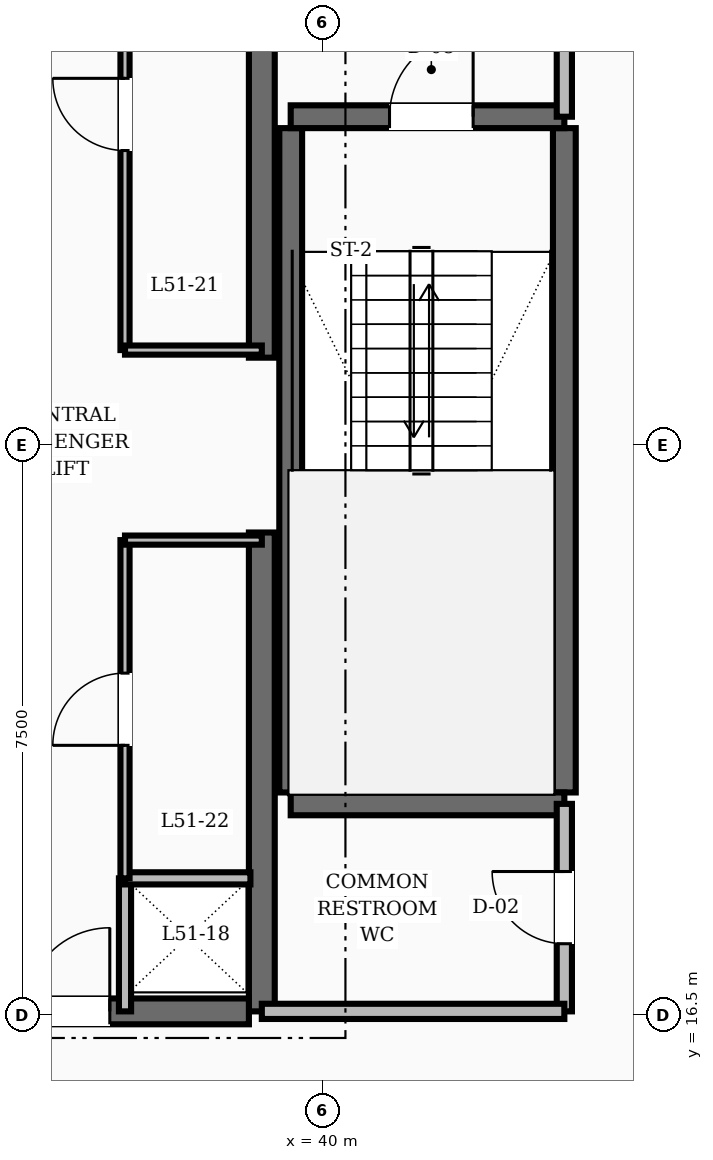
"""IFC4 building model, lengths in metres.
Left out: names, types, materials, properties, quantities, classifications, styles, units other than length and angle.
Written with IfcOpenShell. Run it as: python <this file> out.ifc"""

import sys

from ifc_helpers import new_model, si_unit, direction, frame, frame_2d, origin, place, context, subcontext, project, spatial, rectangle, extrude, element, fill, save


model = new_model("IFC4")
c1 = context("Model", 3, precision=1e-05, world=origin(), true_north=direction((0.0, 1.0)))
c2 = subcontext(c1, "Body", "Model", "MODEL_VIEW")
j1 = project(units=[si_unit("LENGTHUNIT", "METRE"), si_unit("PLANEANGLEUNIT", "RADIAN")], contexts=[c1])
p1 = place(None, origin())
s1 = spatial("IfcSite", under=j1, at=p1, CompositionType="ELEMENT")
p2 = place(p1, origin())
s2 = spatial("IfcBuilding", under=s1, at=p2, CompositionType="ELEMENT")
p3 = place(p2, frame((0.0, 0.0, 196.4)))
s3 = spatial("IfcBuildingStorey", under=s2, at=p3, CompositionType="ELEMENT", Elevation=196.4)
for number, where, z_axis, x_axis in (
    (1, (39.2, 16.55, 0.0), (0.0, 0.0, 1.0), (0.0, 1.0, 0.0)),
    (2, (39.2, 25.15, 0.0), (0.0, 0.0, 1.0), (0.0, 1.0, 0.0)),
):
    element("IfcWall", number, at=place(p3, frame(where, z_axis=z_axis, x_axis=x_axis)), inside=s3, PredefinedType="SHEAR", context=c2, shape_type="SweptSolid", body=[
        extrude(rectangle(XDim=6.3, YDim=0.34, at=frame_2d((3.15, 0.0))), origin(), (0.0, 0.0, 1.0), 3.6),
    ])
p4 = place(p3, frame((35.8, 16.55, 0.0), z_axis=(0.0, 0.0, 1.0), x_axis=(1.0, 0.0, 0.0)))
e3 = element("IfcWall", 3, at=p4, inside=s3, PredefinedType="SHEAR", context=c2, shape_type="SweptSolid", body=[
    extrude(rectangle(XDim=3.23, YDim=0.34, at=frame_2d((1.615, 0.0))), origin(), (0.0, 0.0, 1.0), 3.6),
])
p5 = place(p4, frame((0.3, 0.0, 0.0)))
e4 = element("IfcOpeningElement", 4, at=p5, cuts=e3, PredefinedType="OPENING", context=c2, shape_type="SweptSolid", body=[
    extrude(rectangle(XDim=1.1, YDim=2.1, at=frame_2d((0.55, 1.05))), frame((0.0, 0.18, 0.0), z_axis=(0.0, -1.0, 0.0), x_axis=(1.0, 0.0, 0.0)), (0.0, 0.0, 1.0), 0.36),
])
for number, where, z_axis, x_axis in (
    (5, (43.18, 19.43, 0.0), (0.0, 0.0, 1.0), (0.0, 1.0, 0.0)),
    (6, (39.58, 19.43, 0.0), (0.0, 0.0, 1.0), (0.0, 1.0, 0.0)),
):
    element("IfcWall", number, at=place(p3, frame(where, z_axis=z_axis, x_axis=x_axis)), inside=s3, PredefinedType="SHEAR", context=c2, shape_type="SweptSolid", body=[
        extrude(rectangle(XDim=8.74, YDim=0.3, at=frame_2d((4.37, 0.0))), origin(), (0.0, 0.0, 1.0), 3.6),
    ])
p6 = place(p3, frame((39.58, 19.28, 0.0), z_axis=(0.0, 0.0, 1.0), x_axis=(1.0, 0.0, 0.0)))
e7 = element("IfcWall", 7, at=p6, inside=s3, PredefinedType="SHEAR", context=c2, shape_type="SweptSolid", body=[
    extrude(rectangle(XDim=3.6, YDim=0.3, at=frame_2d((1.8, 0.0))), origin(), (0.0, 0.0, 1.0), 3.6),
])
p7 = place(p3, frame((39.58, 28.32, 0.0), z_axis=(0.0, 0.0, 1.0), x_axis=(1.0, 0.0, 0.0)))
e8 = element("IfcWall", 8, at=p7, inside=s3, PredefinedType="SHEAR", context=c2, shape_type="SweptSolid", body=[
    extrude(rectangle(XDim=3.6, YDim=0.3, at=frame_2d((1.8, 0.0))), origin(), (0.0, 0.0, 1.0), 3.6),
])
p8 = place(p7, frame((1.3, 0.0, 0.0)))
e9 = element("IfcOpeningElement", 9, at=p8, cuts=e8, PredefinedType="OPENING", context=c2, shape_type="SweptSolid", body=[
    extrude(rectangle(XDim=1.1, YDim=2.1, at=frame_2d((0.55, 1.05))), frame((0.0, 0.16, 0.0), z_axis=(0.0, -1.0, 0.0), x_axis=(1.0, 0.0, 0.0)), (0.0, 0.0, 1.0), 0.32),
])
p9 = place(p3, frame((43.18, 28.32, 0.0), z_axis=(0.0, 0.0, 1.0), x_axis=(0.0, 1.0, 0.0)))
e10 = element("IfcWall", 10, at=p9, inside=s3, PredefinedType="SOLIDWALL", context=c2, shape_type="SweptSolid", body=[
    extrude(rectangle(XDim=3.13, YDim=0.2, at=frame_2d((1.565, 0.0))), origin(), (0.0, 0.0, 1.0), 2.8),
])
p10 = place(p9, frame((1.015, 0.0, 0.0)))
e11 = element("IfcOpeningElement", 11, at=p10, cuts=e10, PredefinedType="OPENING", context=c2, shape_type="SweptSolid", body=[
    extrude(rectangle(XDim=1.1, YDim=2.1, at=frame_2d((0.55, 1.05))), frame((0.0, 0.11, 0.0), z_axis=(0.0, -1.0, 0.0), x_axis=(1.0, 0.0, 0.0)), (0.0, 0.0, 1.0), 0.22),
])
p11 = place(p3, frame((43.18, 16.55, 0.0), z_axis=(0.0, 0.0, 1.0), x_axis=(0.0, 1.0, 0.0)))
e12 = element("IfcWall", 12, at=p11, inside=s3, PredefinedType="SOLIDWALL", context=c2, shape_type="SweptSolid", body=[
    extrude(rectangle(XDim=2.73, YDim=0.2, at=frame_2d((1.365, 0.0))), origin(), (0.0, 0.0, 1.0), 2.8),
])
p12 = place(p11, frame((0.89, 0.0, 0.0)))
e13 = element("IfcOpeningElement", 13, at=p12, cuts=e12, PredefinedType="OPENING", context=c2, shape_type="SweptSolid", body=[
    extrude(rectangle(XDim=0.95, YDim=2.1, at=frame_2d((0.475, 1.05))), frame((0.0, 0.11, 0.0), z_axis=(0.0, -1.0, 0.0), x_axis=(1.0, 0.0, 0.0)), (0.0, 0.0, 1.0), 0.22),
])
p13 = place(p3, frame((39.2, 16.55, 0.0), z_axis=(0.0, 0.0, 1.0), x_axis=(1.0, 0.0, 0.0)))
e14 = element("IfcWall", 14, at=p13, inside=s3, PredefinedType="SOLIDWALL", context=c2, shape_type="SweptSolid", body=[
    extrude(rectangle(XDim=3.98, YDim=0.2, at=frame_2d((1.99, 0.0))), origin(), (0.0, 0.0, 1.0), 2.8),
])
p14 = place(p3, frame((37.4, 16.55, 0.0), z_axis=(0.0, 0.0, 1.0), x_axis=(0.0, 1.0, 0.0)))
e15 = element("IfcWall", 15, at=p14, inside=s3, PredefinedType="SOLIDWALL", context=c2, shape_type="SweptSolid", body=[
    extrude(rectangle(XDim=1.75, YDim=0.16, at=frame_2d((0.875, 0.0))), origin(), (0.0, 0.0, 1.0), 2.8),
])
p15 = place(p3, frame((37.4, 18.3, 0.0), z_axis=(0.0, 0.0, 1.0), x_axis=(1.0, 0.0, 0.0)))
e16 = element("IfcWall", 16, at=p15, inside=s3, PredefinedType="SOLIDWALL", context=c2, shape_type="SweptSolid", body=[
    extrude(rectangle(XDim=1.65, YDim=0.16, at=frame_2d((0.825, 0.0))), origin(), (0.0, 0.0, 1.0), 2.8),
])
p16 = place(p3, frame((37.4, 25.25, 0.0), z_axis=(0.0, 0.0, 1.0), x_axis=(0.0, 1.0, 0.0)))
e17 = element("IfcWall", 17, at=p16, inside=s3, PredefinedType="PARTITIONING", context=c2, shape_type="SweptSolid", body=[
    extrude(rectangle(XDim=6.2, YDim=0.12, at=frame_2d((3.1, 0.0))), origin(), (0.0, 0.0, 1.0), 2.8),
])
p17 = place(p16, frame((2.625, 0.0, 0.0)))
e18 = element("IfcOpeningElement", 18, at=p17, cuts=e17, PredefinedType="OPENING", context=c2, shape_type="SweptSolid", body=[
    extrude(rectangle(XDim=0.95, YDim=2.1, at=frame_2d((0.475, 1.05))), frame((0.0, 0.07, 0.0), z_axis=(0.0, -1.0, 0.0), x_axis=(1.0, 0.0, 0.0)), (0.0, 0.0, 1.0), 0.14),
])
p18 = place(p3, frame((37.4, 25.25, 0.0), z_axis=(0.0, 0.0, 1.0), x_axis=(1.0, 0.0, 0.0)))
e19 = element("IfcWall", 19, at=p18, inside=s3, PredefinedType="PARTITIONING", context=c2, shape_type="SweptSolid", body=[
    extrude(rectangle(XDim=1.8, YDim=0.12, at=frame_2d((0.9, 0.0))), origin(), (0.0, 0.0, 1.0), 2.8),
])
p19 = place(p3, frame((37.4, 18.3, 0.0), z_axis=(0.0, 0.0, 1.0), x_axis=(0.0, 1.0, 0.0)))
e20 = element("IfcWall", 20, at=p19, inside=s3, PredefinedType="PARTITIONING", context=c2, shape_type="SweptSolid", body=[
    extrude(rectangle(XDim=4.45, YDim=0.12, at=frame_2d((2.225, 0.0))), origin(), (0.0, 0.0, 1.0), 2.8),
])
p20 = place(p19, frame((1.75, 0.0, 0.0)))
e21 = element("IfcOpeningElement", 21, at=p20, cuts=e20, PredefinedType="OPENING", context=c2, shape_type="SweptSolid", body=[
    extrude(rectangle(XDim=0.95, YDim=2.1, at=frame_2d((0.475, 1.05))), frame((0.0, 0.07, 0.0), z_axis=(0.0, -1.0, 0.0), x_axis=(1.0, 0.0, 0.0)), (0.0, 0.0, 1.0), 0.14),
])
p21 = place(p3, frame((37.4, 22.75, 0.0), z_axis=(0.0, 0.0, 1.0), x_axis=(1.0, 0.0, 0.0)))
e22 = element("IfcWall", 22, at=p21, inside=s3, PredefinedType="PARTITIONING", context=c2, shape_type="SweptSolid", body=[
    extrude(rectangle(XDim=1.8, YDim=0.12, at=frame_2d((0.9, 0.0))), origin(), (0.0, 0.0, 1.0), 2.8),
])
p22 = place(p8, origin())
e23 = element("IfcDoor", 23, at=p22, inside=s3, OperationType="SINGLE_SWING_RIGHT", PredefinedType="DOOR", context=c2, shape_type="SweptSolid", body=[
    extrude(rectangle(XDim=1.1, YDim=2.1, at=frame_2d((0.55, 1.05))), frame((0.0, 0.025, 0.0), z_axis=(0.0, -1.0, 0.0), x_axis=(1.0, 0.0, 0.0)), (0.0, 0.0, 1.0), 0.05),
])
fill(e9, e23)
p23 = place(p12, origin())
e24 = element("IfcDoor", 24, at=p23, inside=s3, OperationType="SINGLE_SWING_RIGHT", PredefinedType="DOOR", context=c2, shape_type="SweptSolid", body=[
    extrude(rectangle(XDim=0.95, YDim=2.1, at=frame_2d((0.475, 1.05))), frame((0.0, 0.025, 0.0), z_axis=(0.0, -1.0, 0.0), x_axis=(1.0, 0.0, 0.0)), (0.0, 0.0, 1.0), 0.05),
])
fill(e13, e24)
p24 = place(p5, origin())
e25 = element("IfcDoor", 25, at=p24, inside=s3, OperationType="SINGLE_SWING_RIGHT", PredefinedType="DOOR", context=c2, shape_type="SweptSolid", body=[
    extrude(rectangle(XDim=1.1, YDim=2.1, at=frame_2d((0.55, 1.05))), frame((0.0, 0.025, 0.0), z_axis=(0.0, -1.0, 0.0), x_axis=(1.0, 0.0, 0.0)), (0.0, 0.0, 1.0), 0.05),
])
fill(e4, e25)
p25 = place(p17, origin())
e26 = element("IfcDoor", 26, at=p25, inside=s3, OperationType="SINGLE_SWING_RIGHT", PredefinedType="DOOR", context=c2, shape_type="SweptSolid", body=[
    extrude(rectangle(XDim=0.95, YDim=2.1, at=frame_2d((0.475, 1.05))), frame((0.0, 0.025, 0.0), z_axis=(0.0, -1.0, 0.0), x_axis=(1.0, 0.0, 0.0)), (0.0, 0.0, 1.0), 0.05),
])
fill(e18, e26)
p26 = place(p20, origin())
e27 = element("IfcDoor", 27, at=p26, inside=s3, OperationType="SINGLE_SWING_LEFT", PredefinedType="DOOR", context=c2, shape_type="SweptSolid", body=[
    extrude(rectangle(XDim=0.95, YDim=2.1, at=frame_2d((0.475, 1.05))), frame((0.0, 0.025, 0.0), z_axis=(0.0, -1.0, 0.0), x_axis=(1.0, 0.0, 0.0)), (0.0, 0.0, 1.0), 0.05),
])
fill(e21, e27)
save(model, sys.argv[1])
